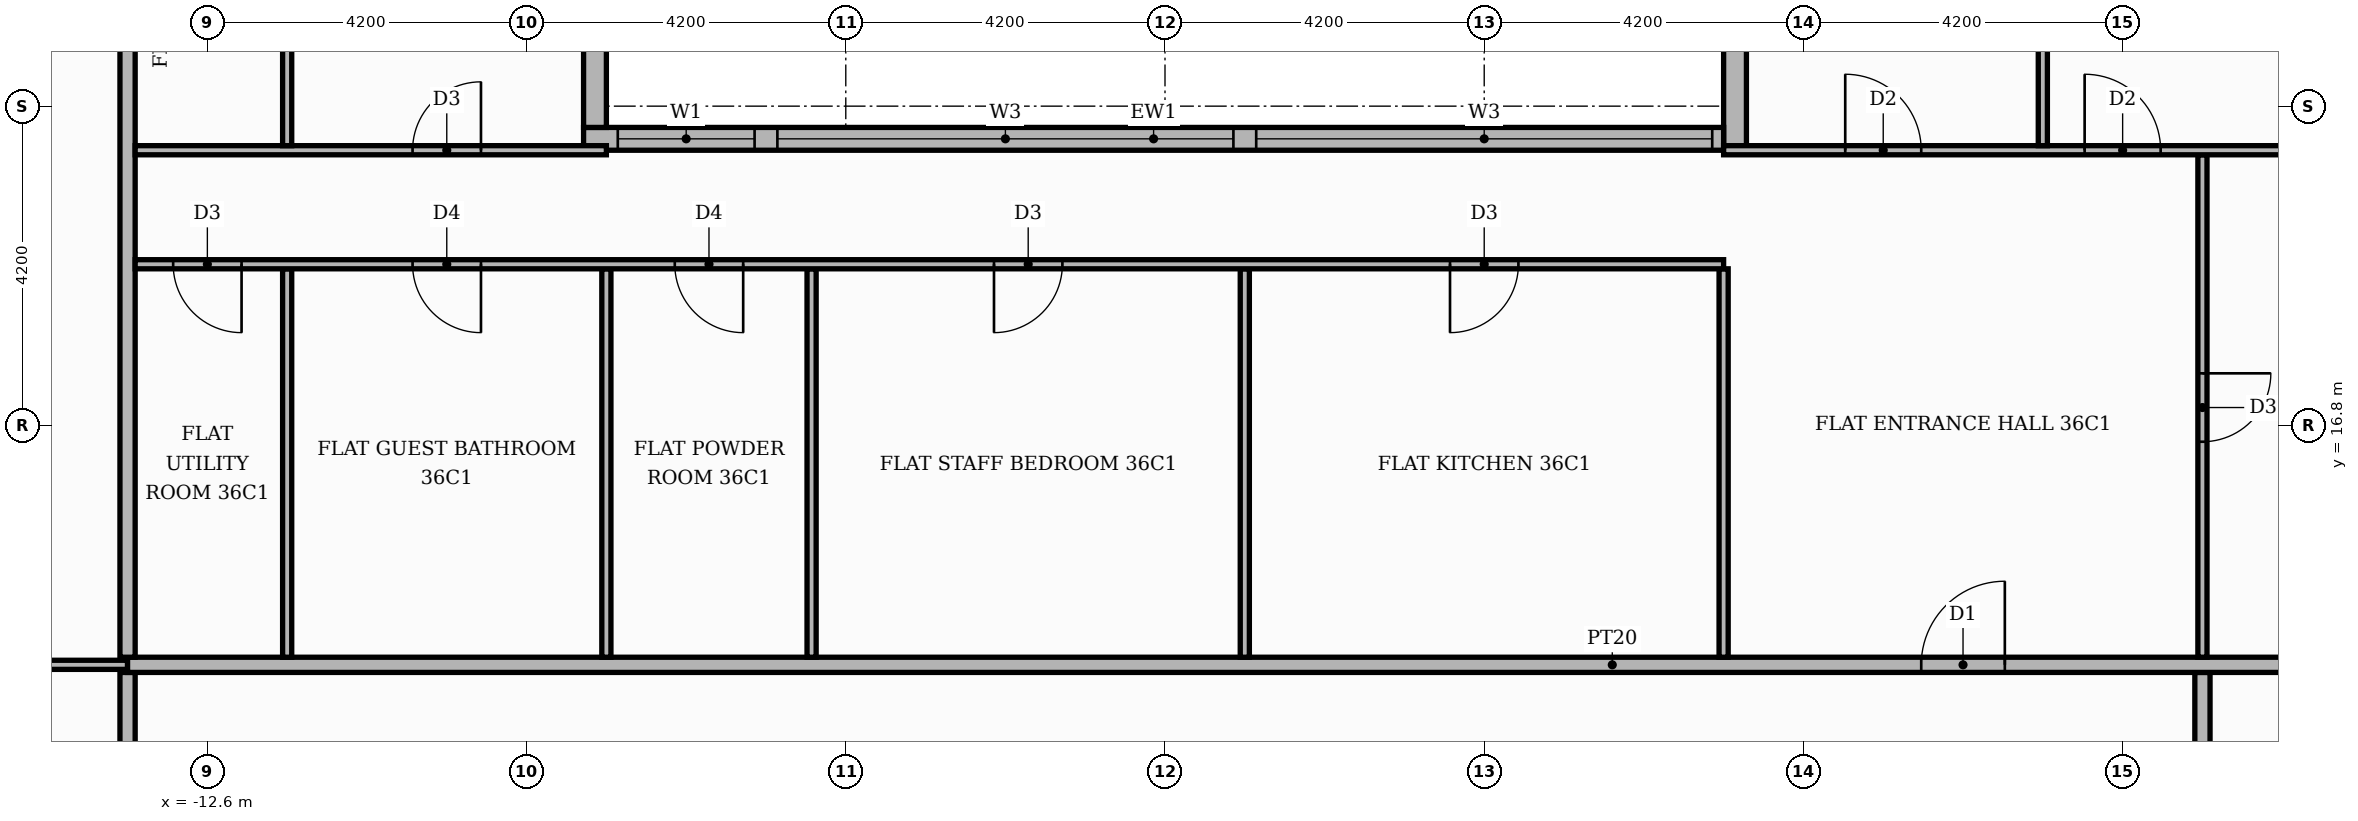
"""IFC4 building model, lengths in metres.
Left out: names, types, materials, properties, quantities, classifications, styles, units other than length and angle.
Written with IfcOpenShell. Run it as: python <this file> out.ifc"""

import sys

from ifc_helpers import new_model, si_unit, direction, frame, frame_2d, origin, place, context, subcontext, project, spatial, rectangle, extrude, element, fill, save


model = new_model("IFC4")
c1 = context("Model", 3, precision=1e-05, world=origin(), true_north=direction((0.0, 1.0)))
c2 = subcontext(c1, "Body", "Model", "MODEL_VIEW")
j1 = project(units=[si_unit("LENGTHUNIT", "METRE"), si_unit("PLANEANGLEUNIT", "RADIAN")], contexts=[c1])
p1 = place(None, origin())
s1 = spatial("IfcSite", under=j1, at=p1, CompositionType="ELEMENT")
p2 = place(p1, origin())
s2 = spatial("IfcBuilding", under=s1, at=p2, CompositionType="ELEMENT")
p3 = place(p2, frame((0.0, 0.0, 153.3)))
s3 = spatial("IfcBuildingStorey", under=s2, at=p3, CompositionType="ELEMENT", Elevation=153.3)
p4 = place(p3, frame((7.5, 25.42, 0.0), z_axis=(0.0, 0.0, 1.0), x_axis=(0.0, -1.0, 0.0)))
e1 = element("IfcWall", 1, at=p4, inside=s3, PredefinedType="STANDARD", context=c2, shape_type="SweptSolid", body=[
    extrude(rectangle(XDim=5.0, YDim=0.3, at=frame_2d((2.5, 0.0))), origin(), (0.0, 0.0, 1.0), 3.48),
])
p5 = place(p4, frame((1.42, 0.0, 0.9)))
e2 = element("IfcOpeningElement", 2, at=p5, cuts=e1, PredefinedType="OPENING", context=c2, shape_type="SweptSolid", body=[
    extrude(rectangle(XDim=1.8, YDim=2.1, at=frame_2d((0.9, 1.05))), frame((0.0, 0.16, 0.0), z_axis=(0.0, -1.0, 0.0), x_axis=(1.0, 0.0, 0.0)), (0.0, 0.0, 1.0), 0.32),
])
p6 = place(p3, frame((7.35, 20.57, 0.0), z_axis=(0.0, 0.0, 1.0), x_axis=(-1.0, 0.0, 0.0)))
e3 = element("IfcWall", 3, at=p6, inside=s3, PredefinedType="STANDARD", context=c2, shape_type="SweptSolid", body=[
    extrude(rectangle(XDim=15.0, YDim=0.3, at=frame_2d((7.5, 0.0))), origin(), (0.0, 0.0, 1.0), 3.48),
])
p7 = place(p6, frame((0.15, 0.0, 0.9)))
e4 = element("IfcOpeningElement", 4, at=p7, cuts=e3, PredefinedType="OPENING", context=c2, shape_type="SweptSolid", body=[
    extrude(rectangle(XDim=6.0, YDim=2.1, at=frame_2d((3.0, 1.05))), frame((0.0, 0.16, 0.0), z_axis=(0.0, -1.0, 0.0), x_axis=(1.0, 0.0, 0.0)), (0.0, 0.0, 1.0), 0.32),
])
p8 = place(p6, frame((6.45, 0.0, 0.9)))
e5 = element("IfcOpeningElement", 5, at=p8, cuts=e3, PredefinedType="OPENING", context=c2, shape_type="SweptSolid", body=[
    extrude(rectangle(XDim=6.0, YDim=2.1, at=frame_2d((3.0, 1.05))), frame((0.0, 0.16, 0.0), z_axis=(0.0, -1.0, 0.0), x_axis=(1.0, 0.0, 0.0)), (0.0, 0.0, 1.0), 0.32),
])
p9 = place(p6, frame((12.75, 0.0, 0.9)))
e6 = element("IfcOpeningElement", 6, at=p9, cuts=e3, PredefinedType="OPENING", context=c2, shape_type="SweptSolid", body=[
    extrude(rectangle(XDim=1.8, YDim=2.1, at=frame_2d((0.9, 1.05))), frame((0.0, 0.16, 0.0), z_axis=(0.0, -1.0, 0.0), x_axis=(1.0, 0.0, 0.0)), (0.0, 0.0, 1.0), 0.32),
])
p10 = place(p3, frame((-7.5, 20.72, 0.0), z_axis=(0.0, 0.0, 1.0), x_axis=(0.0, 1.0, 0.0)))
e7 = element("IfcWall", 7, at=p10, inside=s3, PredefinedType="STANDARD", context=c2, shape_type="SweptSolid", body=[
    extrude(rectangle(XDim=5.0, YDim=0.3, at=frame_2d((2.5, 0.0))), origin(), (0.0, 0.0, 1.0), 3.48),
])
p11 = place(p10, frame((1.48, 0.0, 0.9)))
e8 = element("IfcOpeningElement", 8, at=p11, cuts=e7, PredefinedType="OPENING", context=c2, shape_type="SweptSolid", body=[
    extrude(rectangle(XDim=1.8, YDim=2.1, at=frame_2d((0.9, 1.05))), frame((0.0, 0.16, 0.0), z_axis=(0.0, -1.0, 0.0), x_axis=(1.0, 0.0, 0.0)), (0.0, 0.0, 1.0), 0.32),
])
for number, where, z_axis, x_axis in (
    (9, (-13.65, 11.1, 0.0), (0.0, 0.0, 1.0), (0.0, 1.0, 0.0)),
    (10, (13.65, 11.1, 0.0), (0.0, 0.0, 1.0), (0.0, 1.0, 0.0)),
):
    element("IfcWall", number, at=place(p3, frame(where, z_axis=z_axis, x_axis=x_axis)), inside=s3, PredefinedType="PARTITIONING", context=c2, shape_type="SweptSolid", body=[
        extrude(rectangle(XDim=2.45, YDim=0.2, at=frame_2d((1.225, 0.0))), origin(), (0.0, 0.0, 1.0), 3.48),
    ])
p12 = place(p3, frame((-20.12, 13.65, 0.0), z_axis=(0.0, 0.0, 1.0), x_axis=(1.0, 0.0, 0.0)))
e11 = element("IfcWall", 11, at=p12, inside=s3, PredefinedType="PARTITIONING", context=c2, shape_type="SweptSolid", body=[
    extrude(rectangle(XDim=6.47, YDim=0.12, at=frame_2d((3.235, 0.0))), origin(), (0.0, 0.0, 1.0), 3.48),
])
p13 = place(p12, frame((2.785, 0.0, 0.0)))
e12 = element("IfcOpeningElement", 12, at=p13, cuts=e11, PredefinedType="OPENING", context=c2, shape_type="SweptSolid", body=[
    extrude(rectangle(XDim=0.9, YDim=2.1, at=frame_2d((0.45, 1.05))), frame((0.0, 0.07, 0.0), z_axis=(0.0, -1.0, 0.0), x_axis=(1.0, 0.0, 0.0)), (0.0, 0.0, 1.0), 0.14),
])
p14 = place(p3, frame((-13.65, 13.65, 0.0), z_axis=(0.0, 0.0, 1.0), x_axis=(1.0, 0.0, 0.0)))
e13 = element("IfcWall", 13, at=p14, inside=s3, PredefinedType="PARTITIONING", context=c2, shape_type="SweptSolid", body=[
    extrude(rectangle(XDim=39.07, YDim=0.2, at=frame_2d((19.535, 0.0))), origin(), (0.0, 0.0, 1.0), 3.48),
])
p15 = place(p14, frame((23.6, 0.0, 0.0)))
e14 = element("IfcOpeningElement", 14, at=p15, cuts=e13, PredefinedType="OPENING", context=c2, shape_type="SweptSolid", body=[
    extrude(rectangle(XDim=1.1, YDim=2.4, at=frame_2d((0.55, 1.2))), frame((0.0, 0.11, 0.0), z_axis=(0.0, -1.0, 0.0), x_axis=(1.0, 0.0, 0.0)), (0.0, 0.0, 1.0), 0.22),
])
p16 = place(p3, frame((-13.65, 13.75, 0.0), z_axis=(0.0, 0.0, 1.0), x_axis=(0.0, 1.0, 0.0)))
e15 = element("IfcWall", 15, at=p16, inside=s3, PredefinedType="PARTITIONING", context=c2, shape_type="SweptSolid", body=[
    extrude(rectangle(XDim=11.67, YDim=0.2, at=frame_2d((5.835, 0.0))), origin(), (0.0, 0.0, 1.0), 3.48),
])
for number, where, z_axis, x_axis in (
    (16, (-11.55, 13.75, 0.0), (0.0, 0.0, 1.0), (0.0, 1.0, 0.0)),
    (17, (-7.35, 13.75, 0.0), (0.0, 0.0, 1.0), (0.0, 1.0, 0.0)),
    (18, (-4.65, 13.75, 0.0), (0.0, 0.0, 1.0), (0.0, 1.0, 0.0)),
    (19, (1.05, 13.75, 0.0), (0.0, 0.0, 1.0), (0.0, 1.0, 0.0)),
    (20, (7.35, 13.75, 0.0), (0.0, 0.0, 1.0), (0.0, 1.0, 0.0)),
):
    element("IfcWall", number, at=place(p3, frame(where, z_axis=z_axis, x_axis=x_axis)), inside=s3, PredefinedType="PARTITIONING", context=c2, shape_type="SweptSolid", body=[
        extrude(rectangle(XDim=5.11, YDim=0.12, at=frame_2d((2.555, 0.0))), origin(), (0.0, 0.0, 1.0), 3.48),
    ])
p17 = place(p3, frame((13.65, 13.75, 0.0), z_axis=(0.0, 0.0, 1.0), x_axis=(0.0, 1.0, 0.0)))
e21 = element("IfcWall", 21, at=p17, inside=s3, PredefinedType="PARTITIONING", context=c2, shape_type="SweptSolid", body=[
    extrude(rectangle(XDim=6.61, YDim=0.12, at=frame_2d((3.305, 0.0))), origin(), (0.0, 0.0, 1.0), 3.48),
])
p18 = place(p17, frame((2.835, 0.0, 0.0)))
e22 = element("IfcOpeningElement", 22, at=p18, cuts=e21, PredefinedType="OPENING", context=c2, shape_type="SweptSolid", body=[
    extrude(rectangle(XDim=0.9, YDim=2.1, at=frame_2d((0.45, 1.05))), frame((0.0, 0.07, 0.0), z_axis=(0.0, -1.0, 0.0), x_axis=(1.0, 0.0, 0.0)), (0.0, 0.0, 1.0), 0.14),
])
p19 = place(p3, frame((-13.55, 18.92, 0.0), z_axis=(0.0, 0.0, 1.0), x_axis=(1.0, 0.0, 0.0)))
e23 = element("IfcWall", 23, at=p19, inside=s3, PredefinedType="PARTITIONING", context=c2, shape_type="SweptSolid", body=[
    extrude(rectangle(XDim=20.9, YDim=0.12, at=frame_2d((10.45, 0.0))), origin(), (0.0, 0.0, 1.0), 3.48),
])
p20 = place(p19, frame((17.3, 0.0, 0.0)))
e24 = element("IfcOpeningElement", 24, at=p20, cuts=e23, PredefinedType="OPENING", context=c2, shape_type="SweptSolid", body=[
    extrude(rectangle(XDim=0.9, YDim=2.1, at=frame_2d((0.45, 1.05))), frame((0.0, 0.07, 0.0), z_axis=(0.0, -1.0, 0.0), x_axis=(1.0, 0.0, 0.0)), (0.0, 0.0, 1.0), 0.14),
])
p21 = place(p19, frame((11.3, 0.0, 0.0)))
e25 = element("IfcOpeningElement", 25, at=p21, cuts=e23, PredefinedType="OPENING", context=c2, shape_type="SweptSolid", body=[
    extrude(rectangle(XDim=0.9, YDim=2.1, at=frame_2d((0.45, 1.05))), frame((0.0, 0.07, 0.0), z_axis=(0.0, -1.0, 0.0), x_axis=(1.0, 0.0, 0.0)), (0.0, 0.0, 1.0), 0.14),
])
p22 = place(p19, frame((7.1, 0.0, 0.0)))
e26 = element("IfcOpeningElement", 26, at=p22, cuts=e23, PredefinedType="OPENING", context=c2, shape_type="SweptSolid", body=[
    extrude(rectangle(XDim=0.9, YDim=2.1, at=frame_2d((0.45, 1.05))), frame((0.0, 0.07, 0.0), z_axis=(0.0, -1.0, 0.0), x_axis=(1.0, 0.0, 0.0)), (0.0, 0.0, 1.0), 0.14),
])
p23 = place(p19, frame((3.65, 0.0, 0.0)))
e27 = element("IfcOpeningElement", 27, at=p23, cuts=e23, PredefinedType="OPENING", context=c2, shape_type="SweptSolid", body=[
    extrude(rectangle(XDim=0.9, YDim=2.1, at=frame_2d((0.45, 1.05))), frame((0.0, 0.07, 0.0), z_axis=(0.0, -1.0, 0.0), x_axis=(1.0, 0.0, 0.0)), (0.0, 0.0, 1.0), 0.14),
])
p24 = place(p19, frame((0.5, 0.0, 0.0)))
e28 = element("IfcOpeningElement", 28, at=p24, cuts=e23, PredefinedType="OPENING", context=c2, shape_type="SweptSolid", body=[
    extrude(rectangle(XDim=0.9, YDim=2.1, at=frame_2d((0.45, 1.05))), frame((0.0, 0.07, 0.0), z_axis=(0.0, -1.0, 0.0), x_axis=(1.0, 0.0, 0.0)), (0.0, 0.0, 1.0), 0.14),
])
p25 = place(p3, frame((-13.55, 20.42, 0.0), z_axis=(0.0, 0.0, 1.0), x_axis=(1.0, 0.0, 0.0)))
e29 = element("IfcWall", 29, at=p25, inside=s3, PredefinedType="PARTITIONING", context=c2, shape_type="SweptSolid", body=[
    extrude(rectangle(XDim=6.2, YDim=0.12, at=frame_2d((3.1, 0.0))), origin(), (0.0, 0.0, 1.0), 3.48),
])
p26 = place(p25, frame((3.65, 0.0, 0.0)))
e30 = element("IfcOpeningElement", 30, at=p26, cuts=e29, PredefinedType="OPENING", context=c2, shape_type="SweptSolid", body=[
    extrude(rectangle(XDim=0.9, YDim=2.1, at=frame_2d((0.45, 1.05))), frame((0.0, 0.07, 0.0), z_axis=(0.0, -1.0, 0.0), x_axis=(1.0, 0.0, 0.0)), (0.0, 0.0, 1.0), 0.14),
])
p27 = place(p3, frame((7.35, 20.42, 0.0), z_axis=(0.0, 0.0, 1.0), x_axis=(1.0, 0.0, 0.0)))
e31 = element("IfcWall", 31, at=p27, inside=s3, PredefinedType="PARTITIONING", context=c2, shape_type="SweptSolid", body=[
    extrude(rectangle(XDim=18.07, YDim=0.12, at=frame_2d((9.035, 0.0))), origin(), (0.0, 0.0, 1.0), 3.48),
])
p28 = place(p27, frame((4.75, 0.0, 0.0)))
e32 = element("IfcOpeningElement", 32, at=p28, cuts=e31, PredefinedType="OPENING", context=c2, shape_type="SweptSolid", body=[
    extrude(rectangle(XDim=1.0, YDim=2.1, at=frame_2d((0.5, 1.05))), frame((0.0, 0.07, 0.0), z_axis=(0.0, -1.0, 0.0), x_axis=(1.0, 0.0, 0.0)), (0.0, 0.0, 1.0), 0.14),
])
p29 = place(p27, frame((1.6, 0.0, 0.0)))
e33 = element("IfcOpeningElement", 33, at=p29, cuts=e31, PredefinedType="OPENING", context=c2, shape_type="SweptSolid", body=[
    extrude(rectangle(XDim=1.0, YDim=2.1, at=frame_2d((0.5, 1.05))), frame((0.0, 0.07, 0.0), z_axis=(0.0, -1.0, 0.0), x_axis=(1.0, 0.0, 0.0)), (0.0, 0.0, 1.0), 0.14),
])
p30 = place(p3, frame((-11.55, 20.48, 0.0), z_axis=(0.0, 0.0, 1.0), x_axis=(0.0, 1.0, 0.0)))
e34 = element("IfcWall", 34, at=p30, inside=s3, PredefinedType="PARTITIONING", context=c2, shape_type="SweptSolid", body=[
    extrude(rectangle(XDim=4.94, YDim=0.12, at=frame_2d((2.47, 0.0))), origin(), (0.0, 0.0, 1.0), 3.48),
])
p31 = place(p30, frame((2.14, 0.0, 0.0)))
e35 = element("IfcOpeningElement", 35, at=p31, cuts=e34, PredefinedType="OPENING", context=c2, shape_type="SweptSolid", body=[
    extrude(rectangle(XDim=0.9, YDim=2.1, at=frame_2d((0.45, 1.05))), frame((0.0, 0.07, 0.0), z_axis=(0.0, -1.0, 0.0), x_axis=(1.0, 0.0, 0.0)), (0.0, 0.0, 1.0), 0.14),
])
p32 = place(p3, frame((11.55, 20.48, 0.0), z_axis=(0.0, 0.0, 1.0), x_axis=(0.0, 1.0, 0.0)))
e36 = element("IfcWall", 36, at=p32, inside=s3, PredefinedType="PARTITIONING", context=c2, shape_type="SweptSolid", body=[
    extrude(rectangle(XDim=4.94, YDim=0.12, at=frame_2d((2.47, 0.0))), origin(), (0.0, 0.0, 1.0), 3.48),
])
p33 = place(p7, origin())
e37 = element("IfcWindow", 37, at=p33, inside=s3, PartitioningType="SINGLE_PANEL", PredefinedType="WINDOW", context=c2, shape_type="SweptSolid", body=[
    extrude(rectangle(XDim=6.0, YDim=2.1, at=frame_2d((3.0, 1.05))), frame((0.0, 0.03, 0.0), z_axis=(0.0, -1.0, 0.0), x_axis=(1.0, 0.0, 0.0)), (0.0, 0.0, 1.0), 0.06),
])
fill(e4, e37)
p34 = place(p8, origin())
e38 = element("IfcWindow", 38, at=p34, inside=s3, PartitioningType="SINGLE_PANEL", PredefinedType="WINDOW", context=c2, shape_type="SweptSolid", body=[
    extrude(rectangle(XDim=6.0, YDim=2.1, at=frame_2d((3.0, 1.05))), frame((0.0, 0.03, 0.0), z_axis=(0.0, -1.0, 0.0), x_axis=(1.0, 0.0, 0.0)), (0.0, 0.0, 1.0), 0.06),
])
fill(e5, e38)
p35 = place(p9, origin())
e39 = element("IfcWindow", 39, at=p35, inside=s3, PartitioningType="SINGLE_PANEL", PredefinedType="WINDOW", context=c2, shape_type="SweptSolid", body=[
    extrude(rectangle(XDim=1.8, YDim=2.1, at=frame_2d((0.9, 1.05))), frame((0.0, 0.03, 0.0), z_axis=(0.0, -1.0, 0.0), x_axis=(1.0, 0.0, 0.0)), (0.0, 0.0, 1.0), 0.06),
])
fill(e6, e39)
p36 = place(p15, origin())
e40 = element("IfcDoor", 40, at=p36, inside=s3, OperationType="SINGLE_SWING_RIGHT", PredefinedType="DOOR", context=c2, shape_type="SweptSolid", body=[
    extrude(rectangle(XDim=1.1, YDim=2.4, at=frame_2d((0.55, 1.2))), frame((0.0, 0.025, 0.0), z_axis=(0.0, -1.0, 0.0), x_axis=(1.0, 0.0, 0.0)), (0.0, 0.0, 1.0), 0.05),
])
fill(e14, e40)
p37 = place(p18, frame((0.9, 0.0, 0.0), z_axis=(0.0, 0.0, 1.0), x_axis=(-1.0, 0.0, 0.0)))
e41 = element("IfcDoor", 41, at=p37, inside=s3, OperationType="SINGLE_SWING_RIGHT", PredefinedType="DOOR", context=c2, shape_type="SweptSolid", body=[
    extrude(rectangle(XDim=0.9, YDim=2.1, at=frame_2d((0.45, 1.05))), frame((0.0, 0.025, 0.0), z_axis=(0.0, -1.0, 0.0), x_axis=(1.0, 0.0, 0.0)), (0.0, 0.0, 1.0), 0.05),
])
fill(e22, e41)
p38 = place(p20, frame((0.9, 0.0, 0.0), z_axis=(0.0, 0.0, 1.0), x_axis=(-1.0, 0.0, 0.0)))
e42 = element("IfcDoor", 42, at=p38, inside=s3, OperationType="SINGLE_SWING_LEFT", PredefinedType="DOOR", context=c2, shape_type="SweptSolid", body=[
    extrude(rectangle(XDim=0.9, YDim=2.1, at=frame_2d((0.45, 1.05))), frame((0.0, 0.025, 0.0), z_axis=(0.0, -1.0, 0.0), x_axis=(1.0, 0.0, 0.0)), (0.0, 0.0, 1.0), 0.05),
])
fill(e24, e42)
p39 = place(p21, frame((0.9, 0.0, 0.0), z_axis=(0.0, 0.0, 1.0), x_axis=(-1.0, 0.0, 0.0)))
e43 = element("IfcDoor", 43, at=p39, inside=s3, OperationType="SINGLE_SWING_LEFT", PredefinedType="DOOR", context=c2, shape_type="SweptSolid", body=[
    extrude(rectangle(XDim=0.9, YDim=2.1, at=frame_2d((0.45, 1.05))), frame((0.0, 0.025, 0.0), z_axis=(0.0, -1.0, 0.0), x_axis=(1.0, 0.0, 0.0)), (0.0, 0.0, 1.0), 0.05),
])
fill(e25, e43)
p40 = place(p22, frame((0.9, 0.0, 0.0), z_axis=(0.0, 0.0, 1.0), x_axis=(-1.0, 0.0, 0.0)))
e44 = element("IfcDoor", 44, at=p40, inside=s3, OperationType="SINGLE_SWING_RIGHT", PredefinedType="DOOR", context=c2, shape_type="SweptSolid", body=[
    extrude(rectangle(XDim=0.9, YDim=2.1, at=frame_2d((0.45, 1.05))), frame((0.0, 0.025, 0.0), z_axis=(0.0, -1.0, 0.0), x_axis=(1.0, 0.0, 0.0)), (0.0, 0.0, 1.0), 0.05),
])
fill(e26, e44)
p41 = place(p23, frame((0.9, 0.0, 0.0), z_axis=(0.0, 0.0, 1.0), x_axis=(-1.0, 0.0, 0.0)))
e45 = element("IfcDoor", 45, at=p41, inside=s3, OperationType="SINGLE_SWING_RIGHT", PredefinedType="DOOR", context=c2, shape_type="SweptSolid", body=[
    extrude(rectangle(XDim=0.9, YDim=2.1, at=frame_2d((0.45, 1.05))), frame((0.0, 0.025, 0.0), z_axis=(0.0, -1.0, 0.0), x_axis=(1.0, 0.0, 0.0)), (0.0, 0.0, 1.0), 0.05),
])
fill(e27, e45)
p42 = place(p24, frame((0.9, 0.0, 0.0), z_axis=(0.0, 0.0, 1.0), x_axis=(-1.0, 0.0, 0.0)))
e46 = element("IfcDoor", 46, at=p42, inside=s3, OperationType="SINGLE_SWING_RIGHT", PredefinedType="DOOR", context=c2, shape_type="SweptSolid", body=[
    extrude(rectangle(XDim=0.9, YDim=2.1, at=frame_2d((0.45, 1.05))), frame((0.0, 0.025, 0.0), z_axis=(0.0, -1.0, 0.0), x_axis=(1.0, 0.0, 0.0)), (0.0, 0.0, 1.0), 0.05),
])
fill(e28, e46)
p43 = place(p28, origin())
e47 = element("IfcDoor", 47, at=p43, inside=s3, OperationType="SINGLE_SWING_LEFT", PredefinedType="DOOR", context=c2, shape_type="SweptSolid", body=[
    extrude(rectangle(XDim=1.0, YDim=2.1, at=frame_2d((0.5, 1.05))), frame((0.0, 0.025, 0.0), z_axis=(0.0, -1.0, 0.0), x_axis=(1.0, 0.0, 0.0)), (0.0, 0.0, 1.0), 0.05),
])
fill(e32, e47)
p44 = place(p29, origin())
e48 = element("IfcDoor", 48, at=p44, inside=s3, OperationType="SINGLE_SWING_LEFT", PredefinedType="DOOR", context=c2, shape_type="SweptSolid", body=[
    extrude(rectangle(XDim=1.0, YDim=2.1, at=frame_2d((0.5, 1.05))), frame((0.0, 0.025, 0.0), z_axis=(0.0, -1.0, 0.0), x_axis=(1.0, 0.0, 0.0)), (0.0, 0.0, 1.0), 0.05),
])
fill(e33, e48)
p45 = place(p26, origin())
e49 = element("IfcDoor", 49, at=p45, inside=s3, OperationType="SINGLE_SWING_RIGHT", PredefinedType="DOOR", context=c2, shape_type="SweptSolid", body=[
    extrude(rectangle(XDim=0.9, YDim=2.1, at=frame_2d((0.45, 1.05))), frame((0.0, 0.025, 0.0), z_axis=(0.0, -1.0, 0.0), x_axis=(1.0, 0.0, 0.0)), (0.0, 0.0, 1.0), 0.05),
])
fill(e30, e49)
save(model, sys.argv[1])
